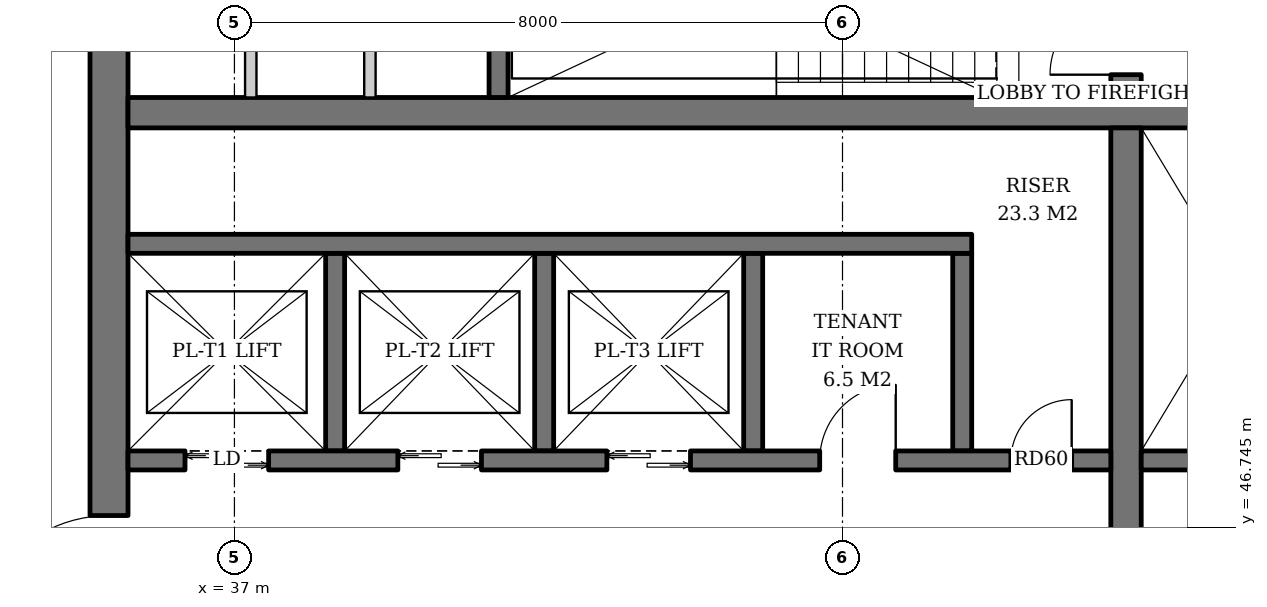
"""IFC4 building model, lengths in metres.
Left out: names, types, materials, properties, quantities, classifications, styles, units other than length and angle.
Written with IfcOpenShell. Run it as: python <this file> out.ifc"""

import sys

from ifc_helpers import new_model, si_unit, direction, frame, frame_2d, origin, place, context, subcontext, project, spatial, rectangle, extrude, element, fill, save


model = new_model("IFC4")
c1 = context("Model", 3, precision=1e-05, world=origin(), true_north=direction((0.0, 1.0)))
c2 = subcontext(c1, "Body", "Model", "MODEL_VIEW")
j1 = project(units=[si_unit("LENGTHUNIT", "METRE"), si_unit("PLANEANGLEUNIT", "RADIAN")], contexts=[c1])
p1 = place(None, origin())
s1 = spatial("IfcSite", under=j1, at=p1, CompositionType="ELEMENT")
p2 = place(p1, origin())
s2 = spatial("IfcBuilding", under=s1, at=p2, CompositionType="ELEMENT")
p3 = place(p2, frame((0.0, 0.0, 241.4)))
s3 = spatial("IfcBuildingStorey", under=s2, at=p3, CompositionType="ELEMENT", Elevation=241.4)
p4 = place(p3, frame((35.35, 36.6, 0.0), z_axis=(0.0, 0.0, 1.0), x_axis=(0.0, 1.0, 0.0)))
e1 = element("IfcWall", 1, at=p4, inside=s3, PredefinedType="SHEAR", context=c2, shape_type="SweptSolid", body=[
    extrude(rectangle(XDim=18.8, YDim=0.5, at=frame_2d((9.4, 0.0))), origin(), (0.0, 0.0, 1.0), 3.8),
])
p5 = place(p4, frame((8.5, 0.0, 0.0)))
e2 = element("IfcOpeningElement", 2, at=p5, cuts=e1, PredefinedType="OPENING", context=c2, shape_type="SweptSolid", body=[
    extrude(rectangle(XDim=1.8, YDim=2.4, at=frame_2d((0.9, 1.2))), frame((0.0, 0.26, 0.0), z_axis=(0.0, -1.0, 0.0), x_axis=(1.0, 0.0, 0.0)), (0.0, 0.0, 1.0), 0.52),
])
p6 = place(p3, frame((35.6, 52.2, 0.0), z_axis=(0.0, 0.0, 1.0), x_axis=(1.0, 0.0, 0.0)))
e3 = element("IfcWall", 3, at=p6, inside=s3, PredefinedType="SHEAR", context=c2, shape_type="SweptSolid", body=[
    extrude(rectangle(XDim=18.8, YDim=0.4, at=frame_2d((9.4, 0.0))), origin(), (0.0, 0.0, 1.0), 3.8),
])
p7 = place(p3, frame((48.73, 40.0, 0.0), z_axis=(0.0, 0.0, 1.0), x_axis=(0.0, 1.0, 0.0)))
e4 = element("IfcWall", 4, at=p7, inside=s3, PredefinedType="SHEAR", context=c2, shape_type="SweptSolid", body=[
    extrude(rectangle(XDim=12.0, YDim=0.4, at=frame_2d((6.0, 0.0))), origin(), (0.0, 0.0, 1.0), 3.8),
])
p8 = place(p3, frame((48.73, 52.4, 0.0), z_axis=(0.0, 0.0, 1.0), x_axis=(0.0, 1.0, 0.0)))
e5 = element("IfcWall", 5, at=p8, inside=s3, PredefinedType="SHEAR", context=c2, shape_type="SweptSolid", body=[
    extrude(rectangle(XDim=3.0, YDim=0.4, at=frame_2d((1.5, 0.0))), origin(), (0.0, 0.0, 1.0), 3.8),
])
p9 = place(p8, frame((0.3, 0.0, 0.0)))
e6 = element("IfcOpeningElement", 6, at=p9, cuts=e5, PredefinedType="OPENING", context=c2, shape_type="SweptSolid", body=[
    extrude(rectangle(XDim=1.0, YDim=2.1, at=frame_2d((0.5, 1.05))), frame((0.0, 0.21, 0.0), z_axis=(0.0, -1.0, 0.0), x_axis=(1.0, 0.0, 0.0)), (0.0, 0.0, 1.0), 0.42),
])
p10 = place(p3, frame((40.475, 52.4, 0.0), z_axis=(0.0, 0.0, 1.0), x_axis=(0.0, 1.0, 0.0)))
e7 = element("IfcWall", 7, at=p10, inside=s3, PredefinedType="SHEAR", context=c2, shape_type="SweptSolid", body=[
    extrude(rectangle(XDim=3.0, YDim=0.25, at=frame_2d((1.5, 0.0))), origin(), (0.0, 0.0, 1.0), 3.8),
])
for number, where, z_axis, x_axis in (
    (8, (38.325, 47.75, 0.0), (0.0, 0.0, 1.0), (0.0, 1.0, 0.0)),
    (9, (41.075, 47.75, 0.0), (0.0, 0.0, 1.0), (0.0, 1.0, 0.0)),
    (10, (43.825, 47.75, 0.0), (0.0, 0.0, 1.0), (0.0, 1.0, 0.0)),
    (11, (46.575, 47.75, 0.0), (0.0, 0.0, 1.0), (0.0, 1.0, 0.0)),
):
    element("IfcWall", number, at=place(p3, frame(where, z_axis=z_axis, x_axis=x_axis)), inside=s3, PredefinedType="SHEAR", context=c2, shape_type="SweptSolid", body=[
        extrude(rectangle(XDim=2.6, YDim=0.25, at=frame_2d((1.3, 0.0))), origin(), (0.0, 0.0, 1.0), 3.8),
    ])
p11 = place(p3, frame((35.6, 50.475, 0.0), z_axis=(0.0, 0.0, 1.0), x_axis=(1.0, 0.0, 0.0)))
e12 = element("IfcWall", 12, at=p11, inside=s3, PredefinedType="SHEAR", context=c2, shape_type="SweptSolid", body=[
    extrude(rectangle(XDim=11.1, YDim=0.25, at=frame_2d((5.55, 0.0))), origin(), (0.0, 0.0, 1.0), 3.8),
])
p12 = place(p3, frame((35.6, 47.625, 0.0), z_axis=(0.0, 0.0, 1.0), x_axis=(1.0, 0.0, 0.0)))
e13 = element("IfcWall", 13, at=p12, inside=s3, PredefinedType="SHEAR", context=c2, shape_type="SweptSolid", body=[
    extrude(rectangle(XDim=12.93, YDim=0.25, at=frame_2d((6.465, 0.0))), origin(), (0.0, 0.0, 1.0), 3.8),
])
p13 = place(p12, frame((0.75, 0.0, 0.0)))
e14 = element("IfcOpeningElement", 14, at=p13, cuts=e13, PredefinedType="OPENING", context=c2, shape_type="SweptSolid", body=[
    extrude(rectangle(XDim=1.1, YDim=2.2, at=frame_2d((0.55, 1.1))), frame((0.0, 0.135, 0.0), z_axis=(0.0, -1.0, 0.0), x_axis=(1.0, 0.0, 0.0)), (0.0, 0.0, 1.0), 0.27),
])
p14 = place(p12, frame((3.55, 0.0, 0.0)))
e15 = element("IfcOpeningElement", 15, at=p14, cuts=e13, PredefinedType="OPENING", context=c2, shape_type="SweptSolid", body=[
    extrude(rectangle(XDim=1.1, YDim=2.2, at=frame_2d((0.55, 1.1))), frame((0.0, 0.135, 0.0), z_axis=(0.0, -1.0, 0.0), x_axis=(1.0, 0.0, 0.0)), (0.0, 0.0, 1.0), 0.27),
])
p15 = place(p12, frame((6.3, 0.0, 0.0)))
e16 = element("IfcOpeningElement", 16, at=p15, cuts=e13, PredefinedType="OPENING", context=c2, shape_type="SweptSolid", body=[
    extrude(rectangle(XDim=1.1, YDim=2.2, at=frame_2d((0.55, 1.1))), frame((0.0, 0.135, 0.0), z_axis=(0.0, -1.0, 0.0), x_axis=(1.0, 0.0, 0.0)), (0.0, 0.0, 1.0), 0.27),
])
p16 = place(p12, frame((9.1, 0.0, 0.0)))
e17 = element("IfcOpeningElement", 17, at=p16, cuts=e13, PredefinedType="OPENING", context=c2, shape_type="SweptSolid", body=[
    extrude(rectangle(XDim=1.0, YDim=2.1, at=frame_2d((0.5, 1.05))), frame((0.0, 0.135, 0.0), z_axis=(0.0, -1.0, 0.0), x_axis=(1.0, 0.0, 0.0)), (0.0, 0.0, 1.0), 0.27),
])
p17 = place(p12, frame((11.615, 0.0, 0.0)))
e18 = element("IfcOpeningElement", 18, at=p17, cuts=e13, PredefinedType="OPENING", context=c2, shape_type="SweptSolid", body=[
    extrude(rectangle(XDim=0.8, YDim=2.0, at=frame_2d((0.4, 1.0))), frame((0.0, 0.135, 0.0), z_axis=(0.0, -1.0, 0.0), x_axis=(1.0, 0.0, 0.0)), (0.0, 0.0, 1.0), 0.27),
])
p18 = place(p3, frame((48.93, 47.625, 0.0), z_axis=(0.0, 0.0, 1.0), x_axis=(1.0, 0.0, 0.0)))
e19 = element("IfcWall", 19, at=p18, inside=s3, PredefinedType="SHEAR", context=c2, shape_type="SweptSolid", body=[
    extrude(rectangle(XDim=5.47, YDim=0.25, at=frame_2d((2.735, 0.0))), origin(), (0.0, 0.0, 1.0), 3.8),
])
for number, where, z_axis, x_axis in (
    (20, (37.215, 52.4, 0.0), (0.0, 0.0, 1.0), (0.0, 1.0, 0.0)),
    (21, (38.782, 52.4, 0.0), (0.0, 0.0, 1.0), (0.0, 1.0, 0.0)),
):
    element("IfcWall", number, at=place(p3, frame(where, z_axis=z_axis, x_axis=x_axis)), inside=s3, PredefinedType="SOLIDWALL", context=c2, shape_type="SweptSolid", body=[
        extrude(rectangle(XDim=3.0, YDim=0.15, at=frame_2d((1.5, 0.0))), origin(), (0.0, 0.0, 1.0), 3.62),
    ])
p19 = place(p13, origin())
e22 = element("IfcDoor", 22, at=p19, inside=s3, OperationType="DOUBLE_DOOR_SLIDING", PredefinedType="DOOR", context=c2, shape_type="SweptSolid", body=[
    extrude(rectangle(XDim=1.1, YDim=2.2, at=frame_2d((0.55, 1.1))), frame((0.0, 0.025, 0.0), z_axis=(0.0, -1.0, 0.0), x_axis=(1.0, 0.0, 0.0)), (0.0, 0.0, 1.0), 0.05),
])
fill(e14, e22)
p20 = place(p14, origin())
e23 = element("IfcDoor", 23, at=p20, inside=s3, OperationType="DOUBLE_DOOR_SLIDING", PredefinedType="DOOR", context=c2, shape_type="SweptSolid", body=[
    extrude(rectangle(XDim=1.1, YDim=2.2, at=frame_2d((0.55, 1.1))), frame((0.0, 0.025, 0.0), z_axis=(0.0, -1.0, 0.0), x_axis=(1.0, 0.0, 0.0)), (0.0, 0.0, 1.0), 0.05),
])
fill(e15, e23)
p21 = place(p15, origin())
e24 = element("IfcDoor", 24, at=p21, inside=s3, OperationType="DOUBLE_DOOR_SLIDING", PredefinedType="DOOR", context=c2, shape_type="SweptSolid", body=[
    extrude(rectangle(XDim=1.1, YDim=2.2, at=frame_2d((0.55, 1.1))), frame((0.0, 0.025, 0.0), z_axis=(0.0, -1.0, 0.0), x_axis=(1.0, 0.0, 0.0)), (0.0, 0.0, 1.0), 0.05),
])
fill(e16, e24)
p22 = place(p16, origin())
e25 = element("IfcDoor", 25, at=p22, inside=s3, OperationType="SINGLE_SWING_RIGHT", PredefinedType="DOOR", context=c2, shape_type="SweptSolid", body=[
    extrude(rectangle(XDim=1.0, YDim=2.1, at=frame_2d((0.5, 1.05))), frame((0.0, 0.025, 0.0), z_axis=(0.0, -1.0, 0.0), x_axis=(1.0, 0.0, 0.0)), (0.0, 0.0, 1.0), 0.05),
])
fill(e17, e25)
p23 = place(p17, origin())
e26 = element("IfcDoor", 26, at=p23, inside=s3, OperationType="SINGLE_SWING_RIGHT", PredefinedType="DOOR", context=c2, shape_type="SweptSolid", body=[
    extrude(rectangle(XDim=0.8, YDim=2.0, at=frame_2d((0.4, 1.0))), frame((0.0, 0.025, 0.0), z_axis=(0.0, -1.0, 0.0), x_axis=(1.0, 0.0, 0.0)), (0.0, 0.0, 1.0), 0.05),
])
fill(e18, e26)
p24 = place(p9, origin())
e27 = element("IfcDoor", 27, at=p24, inside=s3, OperationType="SINGLE_SWING_LEFT", PredefinedType="DOOR", context=c2, shape_type="SweptSolid", body=[
    extrude(rectangle(XDim=1.0, YDim=2.1, at=frame_2d((0.5, 1.05))), frame((0.0, 0.025, 0.0), z_axis=(0.0, -1.0, 0.0), x_axis=(1.0, 0.0, 0.0)), (0.0, 0.0, 1.0), 0.05),
])
fill(e6, e27)
p25 = place(p5, origin())
e28 = element("IfcDoor", 28, at=p25, inside=s3, OperationType="DOUBLE_DOOR_SINGLE_SWING", PredefinedType="DOOR", context=c2, shape_type="SweptSolid", body=[
    extrude(rectangle(XDim=1.8, YDim=2.4, at=frame_2d((0.9, 1.2))), frame((0.0, 0.025, 0.0), z_axis=(0.0, -1.0, 0.0), x_axis=(1.0, 0.0, 0.0)), (0.0, 0.0, 1.0), 0.05),
])
fill(e2, e28)
save(model, sys.argv[1])
